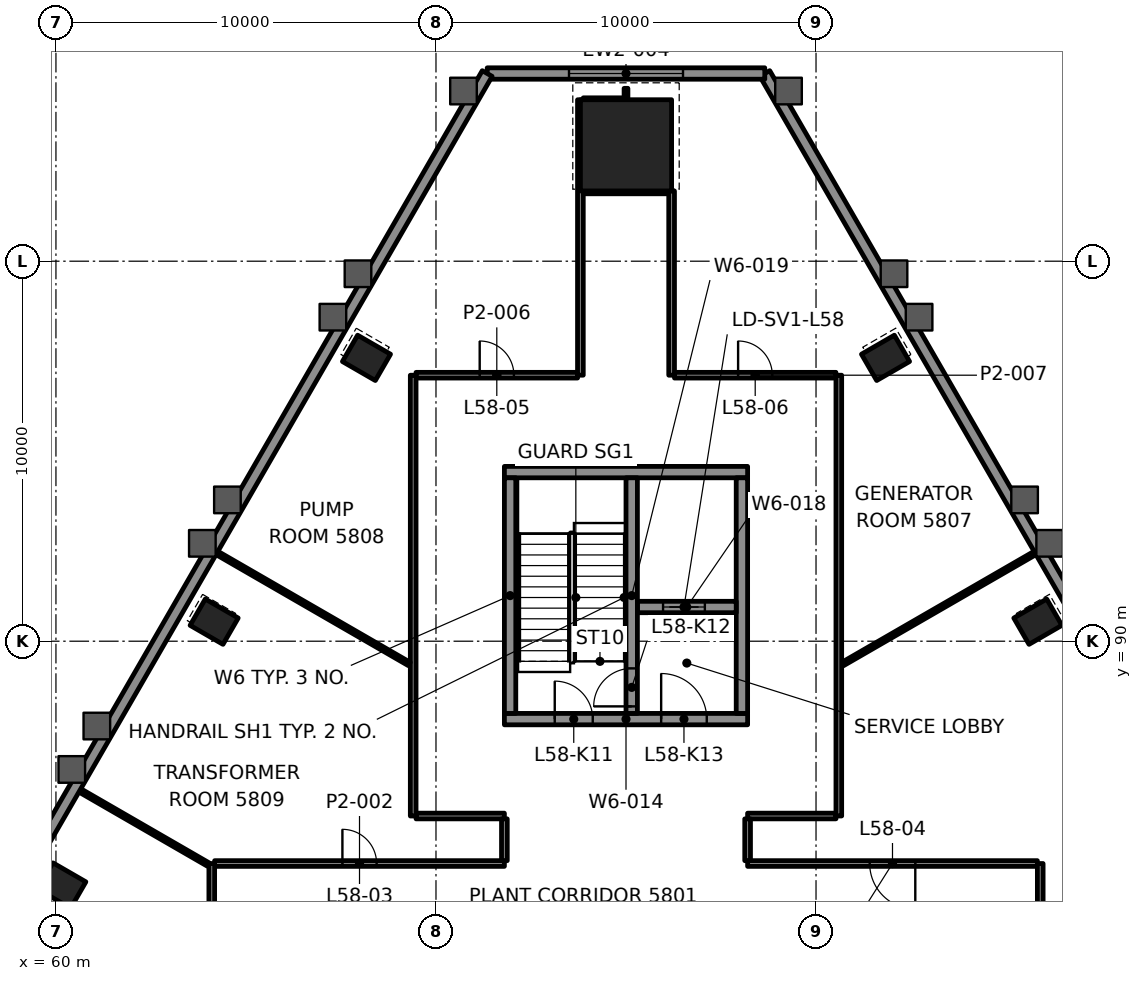
"""IFC4 building model, lengths in metres.
Left out: names, types, materials, properties, quantities, classifications, styles, units other than length and angle.
Written with IfcOpenShell. Run it as: python <this file> out.ifc"""

import sys

from ifc_helpers import new_model, si_unit, direction, frame, frame_2d, origin, origin_2d, place, context, subcontext, project, spatial, rectangle, hollow_rectangle, extrude, element, fill, save


model = new_model("IFC4")
c1 = context("Model", 3, precision=1e-05, world=origin(), true_north=direction((0.0, 1.0)))
c2 = subcontext(c1, "Body", "Model", "MODEL_VIEW")
j1 = project(units=[si_unit("LENGTHUNIT", "METRE"), si_unit("PLANEANGLEUNIT", "RADIAN")], contexts=[c1])
p1 = place(None, origin())
s1 = spatial("IfcSite", under=j1, at=p1, CompositionType="ELEMENT")
p2 = place(p1, origin())
s2 = spatial("IfcBuilding", under=s1, at=p2, CompositionType="ELEMENT")
p3 = place(p2, frame((0.0, 0.0, 247.6)))
s3 = spatial("IfcBuildingStorey", under=s2, at=p3, CompositionType="ELEMENT", Elevation=247.6)
p4 = place(p3, frame((75.0, 103.049, 0.0), z_axis=(0.0, 0.0, 1.0), x_axis=(-1.0, 0.0, 0.0)))
e1 = element("IfcColumn", 1, at=p4, inside=s3, PredefinedType="COLUMN", context=c2, shape_type="SweptSolid", body=[
    extrude(rectangle(XDim=2.4, YDim=2.4, at=origin_2d()), origin(), (0.0, 0.0, 1.0), 4.5),
])
for number, where, z_axis, x_axis in (
    (2, (85.837, 90.514, -0.0), (0.0, 0.0, 1.0), (-0.5, 0.866, 0.0)),
    (3, (81.829, 97.456, -0.0), (0.0, 0.0, 1.0), (-0.5, 0.866, 0.0)),
    (4, (68.171, 97.456, -0.0), (0.0, 0.0, 1.0), (-0.5, -0.866, 0.0)),
    (5, (64.163, 90.514, -0.0), (0.0, 0.0, 1.0), (-0.5, -0.866, 0.0)),
    (6, (60.155, 83.571, -0.0), (0.0, 0.0, 1.0), (-0.5, -0.866, 0.0)),
):
    element("IfcColumn", number, at=place(p3, frame(where, z_axis=z_axis, x_axis=x_axis)), inside=s3, PredefinedType="COLUMN", context=c2, shape_type="SweptSolid", body=[
        extrude(hollow_rectangle(XDim=0.8, YDim=1.0, WallThickness=0.05, at=origin_2d()), origin(), (0.0, 0.0, 1.0), 4.5),
    ])
p5 = place(p3, frame((71.8, 87.95, 0.0), z_axis=(0.0, 0.0, 1.0), x_axis=(1.0, 0.0, 0.0)))
e7 = element("IfcWall", 7, at=p5, inside=s3, PredefinedType="SHEAR", context=c2, shape_type="SweptSolid", body=[
    extrude(rectangle(XDim=6.4, YDim=0.3, at=frame_2d((3.2, 0.0))), origin(), (0.0, 0.0, 1.0), 4.05),
])
p6 = place(p5, frame((1.325, 0.0, 0.0)))
e8 = element("IfcOpeningElement", 8, at=p6, cuts=e7, PredefinedType="OPENING", context=c2, shape_type="SweptSolid", body=[
    extrude(rectangle(XDim=1.0, YDim=2.1, at=frame_2d((0.5, 1.05))), frame((0.0, 0.16, 0.0), z_axis=(0.0, -1.0, 0.0), x_axis=(1.0, 0.0, 0.0)), (0.0, 0.0, 1.0), 0.32),
])
p7 = place(p5, frame((4.125, 0.0, 0.0)))
e9 = element("IfcOpeningElement", 9, at=p7, cuts=e7, PredefinedType="OPENING", context=c2, shape_type="SweptSolid", body=[
    extrude(rectangle(XDim=1.2, YDim=2.1, at=frame_2d((0.6, 1.05))), frame((0.0, 0.16, 0.0), z_axis=(0.0, -1.0, 0.0), x_axis=(1.0, 0.0, 0.0)), (0.0, 0.0, 1.0), 0.32),
])
p8 = place(p3, frame((71.8, 94.45, 0.0), z_axis=(0.0, 0.0, 1.0), x_axis=(1.0, 0.0, 0.0)))
e10 = element("IfcWall", 10, at=p8, inside=s3, PredefinedType="SHEAR", context=c2, shape_type="SweptSolid", body=[
    extrude(rectangle(XDim=6.4, YDim=0.3, at=frame_2d((3.2, 0.0))), origin(), (0.0, 0.0, 1.0), 4.05),
])
for number, where, z_axis, x_axis in (
    (11, (71.95, 88.1, 0.0), (0.0, 0.0, 1.0), (0.0, 1.0, 0.0)),
    (12, (78.05, 88.1, 0.0), (0.0, 0.0, 1.0), (0.0, 1.0, 0.0)),
):
    element("IfcWall", number, at=place(p3, frame(where, z_axis=z_axis, x_axis=x_axis)), inside=s3, PredefinedType="SHEAR", context=c2, shape_type="SweptSolid", body=[
        extrude(rectangle(XDim=6.2, YDim=0.3, at=frame_2d((3.1, 0.0))), origin(), (0.0, 0.0, 1.0), 4.05),
    ])
p9 = place(p3, frame((75.3, 90.9, 0.0), z_axis=(0.0, 0.0, 1.0), x_axis=(1.0, 0.0, 0.0)))
e13 = element("IfcWall", 13, at=p9, inside=s3, PredefinedType="SHEAR", context=c2, shape_type="SweptSolid", body=[
    extrude(rectangle(XDim=2.6, YDim=0.3, at=frame_2d((1.3, 0.0))), origin(), (0.0, 0.0, 1.0), 4.05),
])
p10 = place(p9, frame((0.675, 0.0, 0.0)))
e14 = element("IfcOpeningElement", 14, at=p10, cuts=e13, PredefinedType="OPENING", context=c2, shape_type="SweptSolid", body=[
    extrude(rectangle(XDim=1.1, YDim=2.1, at=frame_2d((0.55, 1.05))), frame((0.0, 0.16, 0.0), z_axis=(0.0, -1.0, 0.0), x_axis=(1.0, 0.0, 0.0)), (0.0, 0.0, 1.0), 0.32),
])
p11 = place(p3, frame((75.15, 88.1, 0.0), z_axis=(0.0, 0.0, 1.0), x_axis=(0.0, 1.0, 0.0)))
e15 = element("IfcWall", 15, at=p11, inside=s3, PredefinedType="SHEAR", context=c2, shape_type="SweptSolid", body=[
    extrude(rectangle(XDim=6.2, YDim=0.3, at=frame_2d((3.1, 0.0))), origin(), (0.0, 0.0, 1.0), 4.05),
])
p12 = place(p11, frame((0.185, 0.0, 0.0)))
e16 = element("IfcOpeningElement", 16, at=p12, cuts=e15, PredefinedType="OPENING", context=c2, shape_type="SweptSolid", body=[
    extrude(rectangle(XDim=1.0, YDim=2.1, at=frame_2d((0.5, 1.05))), frame((0.0, 0.16, 0.0), z_axis=(0.0, -1.0, 0.0), x_axis=(1.0, 0.0, 0.0)), (0.0, 0.0, 1.0), 0.32),
])
p13 = place(p3, frame((64.176, 84.15, 0.0), z_axis=(0.0, 0.0, 1.0), x_axis=(1.0, 0.0, 0.0)))
e17 = element("IfcWall", 17, at=p13, inside=s3, PredefinedType="PARTITIONING", context=c2, shape_type="SweptSolid", body=[
    extrude(rectangle(XDim=7.625, YDim=0.15, at=frame_2d((3.812, 0.0))), origin(), (0.0, 0.0, 1.0), 3.447),
])
p14 = place(p13, frame((3.362, 0.0, 0.0)))
e18 = element("IfcOpeningElement", 18, at=p14, cuts=e17, PredefinedType="OPENING", context=c2, shape_type="SweptSolid", body=[
    extrude(rectangle(XDim=0.9, YDim=2.1, at=frame_2d((0.45, 1.05))), frame((0.0, 0.085, 0.0), z_axis=(0.0, -1.0, 0.0), x_axis=(1.0, 0.0, 0.0)), (0.0, 0.0, 1.0), 0.17),
])
p15 = place(p3, frame((85.824, 84.15, 0.0), z_axis=(0.0, 0.0, 1.0), x_axis=(-1.0, 0.0, 0.0)))
e19 = element("IfcWall", 19, at=p15, inside=s3, PredefinedType="PARTITIONING", context=c2, shape_type="SweptSolid", body=[
    extrude(rectangle(XDim=7.625, YDim=0.15, at=frame_2d((3.812, 0.0))), origin(), (0.0, 0.0, 1.0), 3.447),
])
p16 = place(p15, frame((3.212, 0.0, 0.0)))
e20 = element("IfcOpeningElement", 20, at=p16, cuts=e19, PredefinedType="OPENING", context=c2, shape_type="SweptSolid", body=[
    extrude(rectangle(XDim=1.2, YDim=2.1, at=frame_2d((0.6, 1.05))), frame((0.0, 0.085, 0.0), z_axis=(0.0, -1.0, 0.0), x_axis=(1.0, 0.0, 0.0)), (0.0, 0.0, 1.0), 0.17),
])
for number, where, z_axis, x_axis in (
    (21, (69.476, 85.4, 0.0), (0.0, 0.0, 1.0), (1.0, 0.0, 0.0)),
    (22, (78.2, 85.4, 0.0), (0.0, 0.0, 1.0), (1.0, 0.0, 0.0)),
):
    element("IfcWall", number, at=place(p3, frame(where, z_axis=z_axis, x_axis=x_axis)), inside=s3, PredefinedType="PARTITIONING", context=c2, shape_type="SweptSolid", body=[
        extrude(rectangle(XDim=2.324, YDim=0.15, at=frame_2d((1.162, 0.0))), origin(), (0.0, 0.0, 1.0), 3.447),
    ])
p17 = place(p3, frame((69.476, 97.0, 0.0), z_axis=(0.0, 0.0, 1.0), x_axis=(1.0, 0.0, 0.0)))
e23 = element("IfcWall", 23, at=p17, inside=s3, PredefinedType="PARTITIONING", context=c2, shape_type="SweptSolid", body=[
    extrude(rectangle(XDim=4.25, YDim=0.15, at=frame_2d((2.125, 0.0))), origin(), (0.0, 0.0, 1.0), 3.45),
])
p18 = place(p17, frame((1.675, 0.0, 0.0)))
e24 = element("IfcOpeningElement", 24, at=p18, cuts=e23, PredefinedType="OPENING", context=c2, shape_type="SweptSolid", body=[
    extrude(rectangle(XDim=0.9, YDim=2.1, at=frame_2d((0.45, 1.05))), frame((0.0, 0.085, 0.0), z_axis=(0.0, -1.0, 0.0), x_axis=(1.0, 0.0, 0.0)), (0.0, 0.0, 1.0), 0.17),
])
p19 = place(p3, frame((76.275, 97.0, 0.0), z_axis=(0.0, 0.0, 1.0), x_axis=(1.0, 0.0, 0.0)))
e25 = element("IfcWall", 25, at=p19, inside=s3, PredefinedType="PARTITIONING", context=c2, shape_type="SweptSolid", body=[
    extrude(rectangle(XDim=4.25, YDim=0.15, at=frame_2d((2.125, 0.0))), origin(), (0.0, 0.0, 1.0), 3.45),
])
p20 = place(p19, frame((1.675, 0.0, 0.0)))
e26 = element("IfcOpeningElement", 26, at=p20, cuts=e25, PredefinedType="OPENING", context=c2, shape_type="SweptSolid", body=[
    extrude(rectangle(XDim=0.9, YDim=2.1, at=frame_2d((0.45, 1.05))), frame((0.0, 0.085, 0.0), z_axis=(0.0, -1.0, 0.0), x_axis=(1.0, 0.0, 0.0)), (0.0, 0.0, 1.0), 0.17),
])
p21 = place(p3, frame((73.875, 101.849, 0.0), z_axis=(0.0, 0.0, 1.0), x_axis=(1.0, 0.0, 0.0)))
e27 = element("IfcWall", 27, at=p21, inside=s3, PredefinedType="PARTITIONING", context=c2, shape_type="SweptSolid", body=[
    extrude(rectangle(XDim=2.249, YDim=0.15, at=frame_2d((1.125, 0.0))), origin(), (0.0, 0.0, 1.0), 3.447),
])
p22 = place(p3, frame((73.875, 104.249, 0.0), z_axis=(0.0, 0.0, 1.0), x_axis=(1.0, 0.0, 0.0)))
e28 = element("IfcWall", 28, at=p22, inside=s3, PredefinedType="PARTITIONING", context=c2, shape_type="SweptSolid", body=[
    extrude(rectangle(XDim=1.125, YDim=0.1, at=frame_2d((0.562, 0.0))), origin(), (0.0, 0.0, 1.0), 3.45),
])
p23 = place(p3, frame((80.701, 89.4, 0.0), z_axis=(0.0, 0.0, 1.0), x_axis=(0.866020648857, 0.500008235685, 0.0)))
e29 = element("IfcWall", 29, at=p23, inside=s3, PredefinedType="PARTITIONING", context=c2, shape_type="SweptSolid", body=[
    extrude(rectangle(XDim=5.965, YDim=0.1, at=frame_2d((2.983, 0.0))), origin(), (0.0, 0.0, 1.0), 3.372),
])
p24 = place(p3, frame((85.9, 70.179, 0.0), z_axis=(0.0, 0.0, 1.0), x_axis=(0.0, 1.0, 0.0)))
e30 = element("IfcWall", 30, at=p24, inside=s3, PredefinedType="PARTITIONING", context=c2, shape_type="SweptSolid", body=[
    extrude(rectangle(XDim=13.97, YDim=0.15, at=frame_2d((6.985, 0.0))), origin(), (0.0, 0.0, 1.0), 3.45),
])
p25 = place(p3, frame((80.6, 85.401, 0.0), z_axis=(0.0, 0.0, 1.0), x_axis=(0.0, 1.0, 0.0)))
e31 = element("IfcWall", 31, at=p25, inside=s3, PredefinedType="PARTITIONING", context=c2, shape_type="SweptSolid", body=[
    extrude(rectangle(XDim=11.599, YDim=0.15, at=frame_2d((5.799, 0.0))), origin(), (0.0, 0.0, 1.0), 3.447),
])
p26 = place(p3, frame((78.2, 84.225, 0.0), z_axis=(0.0, 0.0, 1.0), x_axis=(0.0, 1.0, 0.0)))
e32 = element("IfcWall", 32, at=p26, inside=s3, PredefinedType="PARTITIONING", context=c2, shape_type="SweptSolid", body=[
    extrude(rectangle(XDim=1.1, YDim=0.15, at=frame_2d((0.55, 0.0))), origin(), (0.0, 0.0, 1.0), 3.447),
])
p27 = place(p3, frame((76.2, 97.0, 0.0), z_axis=(0.0, 0.0, 1.0), x_axis=(0.0, 1.0, 0.0)))
e33 = element("IfcWall", 33, at=p27, inside=s3, PredefinedType="PARTITIONING", context=c2, shape_type="SweptSolid", body=[
    extrude(rectangle(XDim=4.848, YDim=0.15, at=frame_2d((2.424, 0.0))), origin(), (0.0, 0.0, 1.0), 3.45),
])
p28 = place(p3, frame((75.0, 104.299, 0.0), z_axis=(0.0, 0.0, 1.0), x_axis=(0.0, 1.0, 0.0)))
e34 = element("IfcWall", 34, at=p28, inside=s3, PredefinedType="PARTITIONING", context=c2, shape_type="SweptSolid", body=[
    extrude(rectangle(XDim=0.25, YDim=0.1, at=frame_2d((0.125, 0.0))), origin(), (0.0, 0.0, 1.0), 3.45),
])
p29 = place(p3, frame((73.8, 97.0, 0.0), z_axis=(0.0, 0.0, 1.0), x_axis=(0.0, 1.0, 0.0)))
e35 = element("IfcWall", 35, at=p29, inside=s3, PredefinedType="PARTITIONING", context=c2, shape_type="SweptSolid", body=[
    extrude(rectangle(XDim=7.249, YDim=0.15, at=frame_2d((3.624, 0.0))), origin(), (0.0, 0.0, 1.0), 3.45),
])
p30 = place(p3, frame((71.8, 84.225, 0.0), z_axis=(0.0, 0.0, 1.0), x_axis=(0.0, 1.0, 0.0)))
e36 = element("IfcWall", 36, at=p30, inside=s3, PredefinedType="PARTITIONING", context=c2, shape_type="SweptSolid", body=[
    extrude(rectangle(XDim=1.1, YDim=0.15, at=frame_2d((0.55, 0.0))), origin(), (0.0, 0.0, 1.0), 3.447),
])
p31 = place(p3, frame((69.4, 85.4, 0.0), z_axis=(0.0, 0.0, 1.0), x_axis=(0.0, 1.0, 0.0)))
e37 = element("IfcWall", 37, at=p31, inside=s3, PredefinedType="PARTITIONING", context=c2, shape_type="SweptSolid", body=[
    extrude(rectangle(XDim=11.599, YDim=0.15, at=frame_2d((5.8, 0.0))), origin(), (0.0, 0.0, 1.0), 3.447),
])
p32 = place(p3, frame((64.1, 70.179, 0.0), z_axis=(0.0, 0.0, 1.0), x_axis=(0.0, 1.0, 0.0)))
e38 = element("IfcWall", 38, at=p32, inside=s3, PredefinedType="PARTITIONING", context=c2, shape_type="SweptSolid", body=[
    extrude(rectangle(XDim=13.97, YDim=0.15, at=frame_2d((6.985, 0.0))), origin(), (0.0, 0.0, 1.0), 3.45),
])
p33 = place(p32, frame((7.825, 0.0, 0.0)))
e39 = element("IfcOpeningElement", 39, at=p33, cuts=e38, PredefinedType="OPENING", context=c2, shape_type="SweptSolid", body=[
    extrude(rectangle(XDim=0.9, YDim=2.1, at=frame_2d((0.45, 1.05))), frame((0.0, 0.085, 0.0), z_axis=(0.0, -1.0, 0.0), x_axis=(1.0, 0.0, 0.0)), (0.0, 0.0, 1.0), 0.17),
])
p34 = place(p3, frame((69.299, 89.4, 0.0), z_axis=(0.0, 0.0, 1.0), x_axis=(-0.866020648857, 0.500008235685, 0.0)))
e40 = element("IfcWall", 40, at=p34, inside=s3, PredefinedType="PARTITIONING", context=c2, shape_type="SweptSolid", body=[
    extrude(rectangle(XDim=5.965, YDim=0.1, at=frame_2d((2.983, 0.0))), origin(), (0.0, 0.0, 1.0), 3.372),
])
p35 = place(p3, frame((64.008, 84.124, 0.0), z_axis=(0.0, 0.0, 1.0), x_axis=(-0.866018749026, 0.500011526203, 0.0)))
e41 = element("IfcWall", 41, at=p35, inside=s3, PredefinedType="PARTITIONING", context=c2, shape_type="SweptSolid", body=[
    extrude(rectangle(XDim=4.021, YDim=0.1, at=frame_2d((2.01, 0.0))), origin(), (0.0, 0.0, 1.0), 3.372),
])
p36 = place(p3, frame((102.754, 63.193, 0.0), z_axis=(0.0, 0.0, 1.0), x_axis=(-0.500001140025, 0.866024745589, 0.0)))
e42 = element("IfcWall", 42, at=p36, inside=s3, PredefinedType="SOLIDWALL", context=c2, shape_type="SweptSolid", body=[
    extrude(rectangle(XDim=48.204, YDim=0.3, at=frame_2d((24.102, 0.0))), origin(), (0.0, 0.0, 1.0), 4.05),
])
p37 = place(p3, frame((78.652, 104.939, 0.0), z_axis=(0.0, 0.0, 1.0), x_axis=(-1.0, 0.0, 0.0)))
e43 = element("IfcWall", 43, at=p37, inside=s3, PredefinedType="SOLIDWALL", context=c2, shape_type="SweptSolid", body=[
    extrude(rectangle(XDim=7.304, YDim=0.3, at=frame_2d((3.652, 0.0))), origin(), (0.0, 0.0, 1.0), 4.05),
])
p38 = place(p37, frame((2.152, 0.0, 0.8)))
e44 = element("IfcOpeningElement", 44, at=p38, cuts=e43, PredefinedType="OPENING", context=c2, shape_type="SweptSolid", body=[
    extrude(rectangle(XDim=3.0, YDim=2.4, at=frame_2d((1.5, 1.2))), frame((0.0, 0.16, 0.0), z_axis=(0.0, -1.0, 0.0), x_axis=(1.0, 0.0, 0.0)), (0.0, 0.0, 1.0), 0.32),
])
p39 = place(p3, frame((71.348, 104.939, 0.0), z_axis=(0.0, 0.0, 1.0), x_axis=(-0.500001140025, -0.866024745589, 0.0)))
e45 = element("IfcWall", 45, at=p39, inside=s3, PredefinedType="SOLIDWALL", context=c2, shape_type="SweptSolid", body=[
    extrude(rectangle(XDim=48.204, YDim=0.3, at=frame_2d((24.102, 0.0))), origin(), (0.0, 0.0, 1.0), 4.05),
])
p40 = place(p14, origin())
e46 = element("IfcDoor", 46, at=p40, inside=s3, OperationType="SINGLE_SWING_RIGHT", PredefinedType="DOOR", context=c2, shape_type="SweptSolid", body=[
    extrude(rectangle(XDim=0.9, YDim=2.1, at=frame_2d((0.45, 1.05))), frame((0.0, 0.025, 0.0), z_axis=(0.0, -1.0, 0.0), x_axis=(1.0, 0.0, 0.0)), (0.0, 0.0, 1.0), 0.05),
])
fill(e18, e46)
p41 = place(p16, origin())
e47 = element("IfcDoor", 47, at=p41, inside=s3, OperationType="DOUBLE_DOOR_SINGLE_SWING", PredefinedType="DOOR", context=c2, shape_type="SweptSolid", body=[
    extrude(rectangle(XDim=1.2, YDim=2.1, at=frame_2d((0.6, 1.05))), frame((0.0, 0.025, 0.0), z_axis=(0.0, -1.0, 0.0), x_axis=(1.0, 0.0, 0.0)), (0.0, 0.0, 1.0), 0.05),
])
fill(e20, e47)
p42 = place(p18, origin())
e48 = element("IfcDoor", 48, at=p42, inside=s3, OperationType="SINGLE_SWING_LEFT", PredefinedType="DOOR", context=c2, shape_type="SweptSolid", body=[
    extrude(rectangle(XDim=0.9, YDim=2.1, at=frame_2d((0.45, 1.05))), frame((0.0, 0.025, 0.0), z_axis=(0.0, -1.0, 0.0), x_axis=(1.0, 0.0, 0.0)), (0.0, 0.0, 1.0), 0.05),
])
fill(e24, e48)
p43 = place(p20, origin())
e49 = element("IfcDoor", 49, at=p43, inside=s3, OperationType="SINGLE_SWING_RIGHT", PredefinedType="DOOR", context=c2, shape_type="SweptSolid", body=[
    extrude(rectangle(XDim=0.9, YDim=2.1, at=frame_2d((0.45, 1.05))), frame((0.0, 0.025, 0.0), z_axis=(0.0, -1.0, 0.0), x_axis=(1.0, 0.0, 0.0)), (0.0, 0.0, 1.0), 0.05),
])
fill(e26, e49)
p44 = place(p38, origin())
e50 = element("IfcWindow", 50, at=p44, inside=s3, PartitioningType="SINGLE_PANEL", PredefinedType="WINDOW", context=c2, shape_type="SweptSolid", body=[
    extrude(rectangle(XDim=3.0, YDim=2.4, at=frame_2d((1.5, 1.2))), frame((0.0, 0.03, 0.0), z_axis=(0.0, -1.0, 0.0), x_axis=(1.0, 0.0, 0.0)), (0.0, 0.0, 1.0), 0.06),
])
fill(e44, e50)
p45 = place(p10, origin())
e51 = element("IfcDoor", 51, at=p45, inside=s3, OperationType="DOUBLE_DOOR_SLIDING", PredefinedType="DOOR", context=c2, shape_type="SweptSolid", body=[
    extrude(rectangle(XDim=1.1, YDim=2.1, at=frame_2d((0.55, 1.05))), frame((0.0, 0.025, 0.0), z_axis=(0.0, -1.0, 0.0), x_axis=(1.0, 0.0, 0.0)), (0.0, 0.0, 1.0), 0.05),
])
fill(e14, e51)
p46 = place(p6, origin())
e52 = element("IfcDoor", 52, at=p46, inside=s3, OperationType="SINGLE_SWING_RIGHT", PredefinedType="DOOR", context=c2, shape_type="SweptSolid", body=[
    extrude(rectangle(XDim=1.0, YDim=2.1, at=frame_2d((0.5, 1.05))), frame((0.0, 0.025, 0.0), z_axis=(0.0, -1.0, 0.0), x_axis=(1.0, 0.0, 0.0)), (0.0, 0.0, 1.0), 0.05),
])
fill(e8, e52)
p47 = place(p12, origin())
e53 = element("IfcDoor", 53, at=p47, inside=s3, OperationType="SINGLE_SWING_LEFT", PredefinedType="DOOR", context=c2, shape_type="SweptSolid", body=[
    extrude(rectangle(XDim=1.0, YDim=2.1, at=frame_2d((0.5, 1.05))), frame((0.0, 0.025, 0.0), z_axis=(0.0, -1.0, 0.0), x_axis=(1.0, 0.0, 0.0)), (0.0, 0.0, 1.0), 0.05),
])
fill(e16, e53)
p48 = place(p7, origin())
e54 = element("IfcDoor", 54, at=p48, inside=s3, OperationType="SINGLE_SWING_RIGHT", PredefinedType="DOOR", context=c2, shape_type="SweptSolid", body=[
    extrude(rectangle(XDim=1.2, YDim=2.1, at=frame_2d((0.6, 1.05))), frame((0.0, 0.025, 0.0), z_axis=(0.0, -1.0, 0.0), x_axis=(1.0, 0.0, 0.0)), (0.0, 0.0, 1.0), 0.05),
])
fill(e9, e54)
save(model, sys.argv[1])
